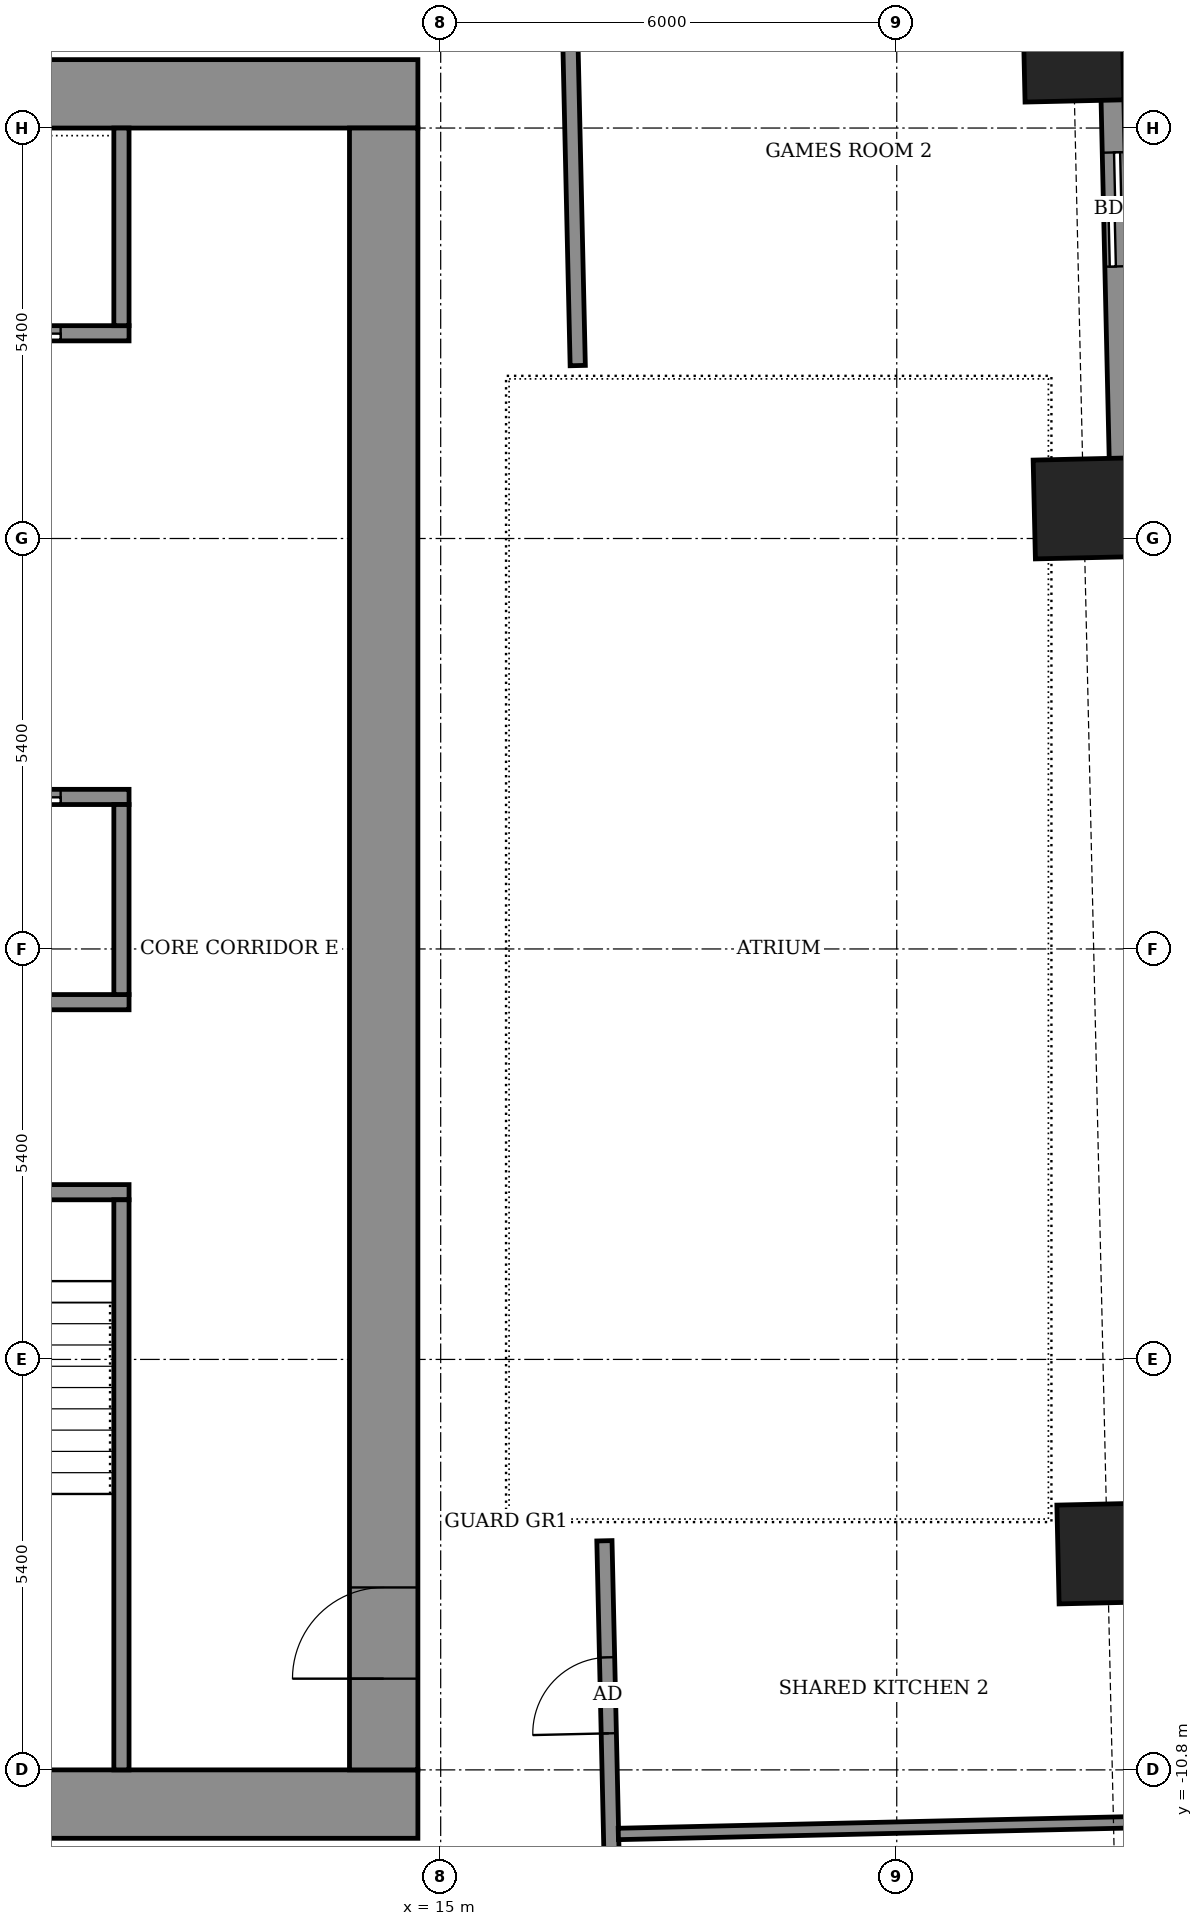
"""IFC4 building model, lengths in metres.
Left out: names, types, materials, properties, quantities, classifications, styles, units other than length and angle.
Written with IfcOpenShell. Run it as: python <this file> out.ifc"""

import sys

from ifc_helpers import new_model, si_unit, direction, frame, frame_2d, origin, origin_2d, place, context, subcontext, project, spatial, rectangle, extrude, element, fill, save


model = new_model("IFC4")
c1 = context("Model", 3, precision=1e-05, world=origin(), true_north=direction((0.0, 1.0)))
c2 = subcontext(c1, "Body", "Model", "MODEL_VIEW")
j1 = project(units=[si_unit("LENGTHUNIT", "METRE"), si_unit("PLANEANGLEUNIT", "RADIAN")], contexts=[c1])
p1 = place(None, origin())
s1 = spatial("IfcSite", under=j1, at=p1, CompositionType="ELEMENT")
p2 = place(p1, origin())
s2 = spatial("IfcBuilding", under=s1, at=p2, CompositionType="ELEMENT")
p3 = place(p2, frame((0.0, 0.0, 144.5)))
s3 = spatial("IfcBuildingStorey", under=s2, at=p3, CompositionType="ELEMENT", Elevation=144.5)
for number, where, z_axis, x_axis in (
    (1, (23.771, -7.952, -0.55), (0.0, 0.0, 1.0), (-0.023, 1.0, 0.0)),
    (2, (23.459, 5.796, -0.55), (0.0, 0.0, 1.0), (-0.023, 1.0, 0.0)),
    (3, (23.323, 11.806, -0.55), (0.0, 0.0, 1.0), (-0.023, 1.0, 0.0)),
):
    element("IfcColumn", number, at=place(p3, frame(where, z_axis=z_axis, x_axis=x_axis)), inside=s3, PredefinedType="COLUMN", context=c2, shape_type="SweptSolid", body=[
        extrude(rectangle(XDim=1.3, YDim=1.3, at=origin_2d()), origin(), (0.0, 0.0, 1.0), 3.6),
    ])
p4 = place(p3, frame((23.961, 5.752, 0.0), z_axis=(0.0, 0.0, 1.0), x_axis=(-0.022715362207, 0.999741972871, 0.0)))
e4 = element("IfcWall", 4, at=p4, inside=s3, PredefinedType="SOLIDWALL", context=c2, shape_type="SweptSolid", body=[
    extrude(rectangle(XDim=11.93, YDim=0.3, at=frame_2d((5.965, 0.0))), origin(), (0.0, 0.0, 1.0), 3.05),
])
p5 = place(p4, frame((3.228, 0.0, 0.0)))
e5 = element("IfcOpeningElement", 5, at=p5, cuts=e4, PredefinedType="OPENING", context=c2, shape_type="SweptSolid", body=[
    extrude(rectangle(XDim=1.5, YDim=2.4, at=frame_2d((0.75, 1.2))), frame((0.0, 0.16, 0.0), z_axis=(0.0, -1.0, 0.0), x_axis=(1.0, 0.0, 0.0)), (0.0, 0.0, 1.0), 0.32),
])
p6 = place(p4, frame((7.629, 0.0, 0.9)))
e6 = element("IfcOpeningElement", 6, at=p6, cuts=e4, PredefinedType="OPENING", context=c2, shape_type="SweptSolid", body=[
    extrude(rectangle(XDim=0.9, YDim=1.5, at=frame_2d((0.45, 0.75))), frame((0.0, 0.16, 0.0), z_axis=(0.0, -1.0, 0.0), x_axis=(1.0, 0.0, 0.0)), (0.0, 0.0, 1.0), 0.32),
])
p7 = place(p4, frame((9.316, 0.0, 0.9)))
e7 = element("IfcOpeningElement", 7, at=p7, cuts=e4, PredefinedType="OPENING", context=c2, shape_type="SweptSolid", body=[
    extrude(rectangle(XDim=1.2, YDim=1.5, at=frame_2d((0.6, 0.75))), frame((0.0, 0.16, 0.0), z_axis=(0.0, -1.0, 0.0), x_axis=(1.0, 0.0, 0.0)), (0.0, 0.0, 1.0), 0.32),
])
p8 = place(p3, frame((17.328, -15.448, 0.0), z_axis=(0.0, 0.0, 1.0), x_axis=(-0.022680883318, 0.999742755679, 0.0)))
e8 = element("IfcWall", 8, at=p8, inside=s3, PredefinedType="PARTITIONING", context=c2, shape_type="SweptSolid", body=[
    extrude(rectangle(XDim=7.664, YDim=0.2, at=frame_2d((3.832, 0.0))), origin(), (0.0, 0.0, 1.0), 3.05),
])
p9 = place(p8, frame((5.13, 0.0, 0.0)))
e9 = element("IfcOpeningElement", 9, at=p9, cuts=e8, PredefinedType="OPENING", context=c2, shape_type="SweptSolid", body=[
    extrude(rectangle(XDim=1.0, YDim=2.1, at=frame_2d((0.5, 1.05))), frame((0.0, 0.11, 0.0), z_axis=(0.0, -1.0, 0.0), x_axis=(1.0, 0.0, 0.0)), (0.0, 0.0, 1.0), 0.22),
])
p10 = place(p3, frame((17.337, -11.643, 0.0), z_axis=(0.0, 0.0, 1.0), x_axis=(0.999741061159, 0.022755452803, 0.0)))
e10 = element("IfcWall", 10, at=p10, inside=s3, PredefinedType="PARTITIONING", context=c2, shape_type="SweptSolid", body=[
    extrude(rectangle(XDim=7.167, YDim=0.15, at=frame_2d((3.583, 0.0))), origin(), (0.0, 0.0, 1.0), 2.55),
])
p11 = place(p3, frame((16.803, 7.675, 0.0), z_axis=(0.0, 0.0, 1.0), x_axis=(-0.022667483124, 0.999743059595, 0.0)))
e11 = element("IfcWall", 11, at=p11, inside=s3, PredefinedType="PARTITIONING", context=c2, shape_type="SweptSolid", body=[
    extrude(rectangle(XDim=5.245, YDim=0.2, at=frame_2d((2.623, 0.0))), origin(), (0.0, 0.0, 1.0), 3.05),
])
for number, where, z_axis, x_axis in (
    (12, (-14.7, -11.25, 0.0), (0.0, 0.0, 1.0), (1.0, 0.0, 0.0)),
    (13, (-14.7, 11.25, 0.0), (0.0, 0.0, 1.0), (1.0, 0.0, 0.0)),
):
    element("IfcWall", number, at=place(p3, frame(where, z_axis=z_axis, x_axis=x_axis)), inside=s3, PredefinedType="SHEAR", context=c2, shape_type="SweptSolid", body=[
        extrude(rectangle(XDim=29.4, YDim=0.9, at=frame_2d((14.7, 0.0))), origin(), (0.0, 0.0, 1.0), 3.6),
    ])
p12 = place(p3, frame((14.25, -10.8, 0.0), z_axis=(0.0, 0.0, 1.0), x_axis=(0.0, 1.0, 0.0)))
e14 = element("IfcWall", 14, at=p12, inside=s3, PredefinedType="SHEAR", context=c2, shape_type="SweptSolid", body=[
    extrude(rectangle(XDim=21.6, YDim=0.9, at=frame_2d((10.8, 0.0))), origin(), (0.0, 0.0, 1.0), 3.6),
])
p13 = place(p12, frame((1.2, 0.0, 0.0)))
e15 = element("IfcOpeningElement", 15, at=p13, cuts=e14, PredefinedType="OPENING", context=c2, shape_type="SweptSolid", body=[
    extrude(rectangle(XDim=1.2, YDim=2.1, at=frame_2d((0.6, 1.05))), frame((0.0, 0.46, 0.0), z_axis=(0.0, -1.0, 0.0), x_axis=(1.0, 0.0, 0.0)), (0.0, 0.0, 1.0), 0.92),
])
p14 = place(p3, frame((-10.9, -3.2, 0.0), z_axis=(0.0, 0.0, 1.0), x_axis=(1.0, 0.0, 0.0)))
e16 = element("IfcWall", 16, at=p14, inside=s3, PredefinedType="SHEAR", context=c2, shape_type="SweptSolid", body=[
    extrude(rectangle(XDim=21.8, YDim=0.2, at=frame_2d((10.9, 0.0))), origin(), (0.0, 0.0, 1.0), 3.05),
])
p15 = place(p14, frame((1.075, 0.0, 0.0)))
e17 = element("IfcOpeningElement", 17, at=p15, cuts=e16, PredefinedType="OPENING", context=c2, shape_type="SweptSolid", body=[
    extrude(rectangle(XDim=1.1, YDim=2.1, at=frame_2d((0.55, 1.05))), frame((0.0, 0.11, 0.0), z_axis=(0.0, -1.0, 0.0), x_axis=(1.0, 0.0, 0.0)), (0.0, 0.0, 1.0), 0.22),
])
p16 = place(p14, frame((10.325, 0.0, 0.0)))
e18 = element("IfcOpeningElement", 18, at=p16, cuts=e16, PredefinedType="OPENING", context=c2, shape_type="SweptSolid", body=[
    extrude(rectangle(XDim=1.1, YDim=2.1, at=frame_2d((0.55, 1.05))), frame((0.0, 0.11, 0.0), z_axis=(0.0, -1.0, 0.0), x_axis=(1.0, 0.0, 0.0)), (0.0, 0.0, 1.0), 0.22),
])
p17 = place(p14, frame((19.625, 0.0, 0.0)))
e19 = element("IfcOpeningElement", 19, at=p17, cuts=e16, PredefinedType="OPENING", context=c2, shape_type="SweptSolid", body=[
    extrude(rectangle(XDim=1.1, YDim=2.1, at=frame_2d((0.55, 1.05))), frame((0.0, 0.11, 0.0), z_axis=(0.0, -1.0, 0.0), x_axis=(1.0, 0.0, 0.0)), (0.0, 0.0, 1.0), 0.22),
])
p18 = place(p14, frame((5.7, 0.0, 0.0)))
e20 = element("IfcOpeningElement", 20, at=p18, cuts=e16, PredefinedType="OPENING", context=c2, shape_type="SweptSolid", body=[
    extrude(rectangle(XDim=1.1, YDim=2.1, at=frame_2d((0.55, 1.05))), frame((0.0, 0.11, 0.0), z_axis=(0.0, -1.0, 0.0), x_axis=(1.0, 0.0, 0.0)), (0.0, 0.0, 1.0), 0.22),
])
p19 = place(p14, frame((14.975, 0.0, 0.0)))
e21 = element("IfcOpeningElement", 21, at=p19, cuts=e16, PredefinedType="OPENING", context=c2, shape_type="SweptSolid", body=[
    extrude(rectangle(XDim=1.1, YDim=2.1, at=frame_2d((0.55, 1.05))), frame((0.0, 0.11, 0.0), z_axis=(0.0, -1.0, 0.0), x_axis=(1.0, 0.0, 0.0)), (0.0, 0.0, 1.0), 0.22),
])
p20 = place(p3, frame((-10.9, -0.7, 0.0), z_axis=(0.0, 0.0, 1.0), x_axis=(1.0, 0.0, 0.0)))
e22 = element("IfcWall", 22, at=p20, inside=s3, PredefinedType="SHEAR", context=c2, shape_type="SweptSolid", body=[
    extrude(rectangle(XDim=21.8, YDim=0.2, at=frame_2d((10.9, 0.0))), origin(), (0.0, 0.0, 1.0), 3.05),
])
p21 = place(p3, frame((-10.9, 2.0, 0.0), z_axis=(0.0, 0.0, 1.0), x_axis=(1.0, 0.0, 0.0)))
e23 = element("IfcWall", 23, at=p21, inside=s3, PredefinedType="SHEAR", context=c2, shape_type="SweptSolid", body=[
    extrude(rectangle(XDim=21.8, YDim=0.2, at=frame_2d((10.9, 0.0))), origin(), (0.0, 0.0, 1.0), 3.05),
])
p22 = place(p21, frame((14.4, 0.0, 0.0)))
e24 = element("IfcOpeningElement", 24, at=p22, cuts=e23, PredefinedType="OPENING", context=c2, shape_type="SweptSolid", body=[
    extrude(rectangle(XDim=1.1, YDim=2.1, at=frame_2d((0.55, 1.05))), frame((0.0, 0.11, 0.0), z_axis=(0.0, -1.0, 0.0), x_axis=(1.0, 0.0, 0.0)), (0.0, 0.0, 1.0), 0.22),
])
p23 = place(p21, frame((17.1, 0.0, 0.0)))
e25 = element("IfcOpeningElement", 25, at=p23, cuts=e23, PredefinedType="OPENING", context=c2, shape_type="SweptSolid", body=[
    extrude(rectangle(XDim=1.1, YDim=2.1, at=frame_2d((0.55, 1.05))), frame((0.0, 0.11, 0.0), z_axis=(0.0, -1.0, 0.0), x_axis=(1.0, 0.0, 0.0)), (0.0, 0.0, 1.0), 0.22),
])
p24 = place(p21, frame((19.8, 0.0, 0.0)))
e26 = element("IfcOpeningElement", 26, at=p24, cuts=e23, PredefinedType="OPENING", context=c2, shape_type="SweptSolid", body=[
    extrude(rectangle(XDim=1.1, YDim=2.1, at=frame_2d((0.55, 1.05))), frame((0.0, 0.11, 0.0), z_axis=(0.0, -1.0, 0.0), x_axis=(1.0, 0.0, 0.0)), (0.0, 0.0, 1.0), 0.22),
])
p25 = place(p21, frame((1.675, 0.0, 0.0)))
e27 = element("IfcOpeningElement", 27, at=p25, cuts=e23, PredefinedType="OPENING", context=c2, shape_type="SweptSolid", body=[
    extrude(rectangle(XDim=0.9, YDim=2.1, at=frame_2d((0.45, 1.05))), frame((0.0, 0.11, 0.0), z_axis=(0.0, -1.0, 0.0), x_axis=(1.0, 0.0, 0.0)), (0.0, 0.0, 1.0), 0.22),
])
p26 = place(p21, frame((8.425, 0.0, 0.0)))
e28 = element("IfcOpeningElement", 28, at=p26, cuts=e23, PredefinedType="OPENING", context=c2, shape_type="SweptSolid", body=[
    extrude(rectangle(XDim=0.9, YDim=2.1, at=frame_2d((0.45, 1.05))), frame((0.0, 0.11, 0.0), z_axis=(0.0, -1.0, 0.0), x_axis=(1.0, 0.0, 0.0)), (0.0, 0.0, 1.0), 0.22),
])
p27 = place(p3, frame((-10.9, 8.1, 0.0), z_axis=(0.0, 0.0, 1.0), x_axis=(1.0, 0.0, 0.0)))
e29 = element("IfcWall", 29, at=p27, inside=s3, PredefinedType="SHEAR", context=c2, shape_type="SweptSolid", body=[
    extrude(rectangle(XDim=21.8, YDim=0.2, at=frame_2d((10.9, 0.0))), origin(), (0.0, 0.0, 1.0), 3.05),
])
p28 = place(p27, frame((14.4, 0.0, 0.0)))
e30 = element("IfcOpeningElement", 30, at=p28, cuts=e29, PredefinedType="OPENING", context=c2, shape_type="SweptSolid", body=[
    extrude(rectangle(XDim=1.1, YDim=2.1, at=frame_2d((0.55, 1.05))), frame((0.0, 0.11, 0.0), z_axis=(0.0, -1.0, 0.0), x_axis=(1.0, 0.0, 0.0)), (0.0, 0.0, 1.0), 0.22),
])
p29 = place(p27, frame((17.1, 0.0, 0.0)))
e31 = element("IfcOpeningElement", 31, at=p29, cuts=e29, PredefinedType="OPENING", context=c2, shape_type="SweptSolid", body=[
    extrude(rectangle(XDim=1.1, YDim=2.1, at=frame_2d((0.55, 1.05))), frame((0.0, 0.11, 0.0), z_axis=(0.0, -1.0, 0.0), x_axis=(1.0, 0.0, 0.0)), (0.0, 0.0, 1.0), 0.22),
])
p30 = place(p27, frame((19.8, 0.0, 0.0)))
e32 = element("IfcOpeningElement", 32, at=p30, cuts=e29, PredefinedType="OPENING", context=c2, shape_type="SweptSolid", body=[
    extrude(rectangle(XDim=1.1, YDim=2.1, at=frame_2d((0.55, 1.05))), frame((0.0, 0.11, 0.0), z_axis=(0.0, -1.0, 0.0), x_axis=(1.0, 0.0, 0.0)), (0.0, 0.0, 1.0), 0.22),
])
p31 = place(p27, frame((1.675, 0.0, 0.0)))
e33 = element("IfcOpeningElement", 33, at=p31, cuts=e29, PredefinedType="OPENING", context=c2, shape_type="SweptSolid", body=[
    extrude(rectangle(XDim=0.9, YDim=2.1, at=frame_2d((0.45, 1.05))), frame((0.0, 0.11, 0.0), z_axis=(0.0, -1.0, 0.0), x_axis=(1.0, 0.0, 0.0)), (0.0, 0.0, 1.0), 0.22),
])
p32 = place(p27, frame((8.425, 0.0, 0.0)))
e34 = element("IfcOpeningElement", 34, at=p32, cuts=e29, PredefinedType="OPENING", context=c2, shape_type="SweptSolid", body=[
    extrude(rectangle(XDim=0.9, YDim=2.1, at=frame_2d((0.45, 1.05))), frame((0.0, 0.11, 0.0), z_axis=(0.0, -1.0, 0.0), x_axis=(1.0, 0.0, 0.0)), (0.0, 0.0, 1.0), 0.22),
])
p33 = place(p3, frame((10.8, -10.8, 0.0), z_axis=(0.0, 0.0, 1.0), x_axis=(0.0, 1.0, 0.0)))
e35 = element("IfcWall", 35, at=p33, inside=s3, PredefinedType="SHEAR", context=c2, shape_type="SweptSolid", body=[
    extrude(rectangle(XDim=7.5, YDim=0.2, at=frame_2d((3.75, 0.0))), origin(), (0.0, 0.0, 1.0), 3.05),
])
p34 = place(p3, frame((10.8, -0.6, 0.0), z_axis=(0.0, 0.0, 1.0), x_axis=(0.0, 1.0, 0.0)))
e36 = element("IfcWall", 36, at=p34, inside=s3, PredefinedType="SHEAR", context=c2, shape_type="SweptSolid", body=[
    extrude(rectangle(XDim=2.5, YDim=0.2, at=frame_2d((1.25, 0.0))), origin(), (0.0, 0.0, 1.0), 3.05),
])
p35 = place(p3, frame((10.8, 8.2, 0.0), z_axis=(0.0, 0.0, 1.0), x_axis=(0.0, 1.0, 0.0)))
e37 = element("IfcWall", 37, at=p35, inside=s3, PredefinedType="SHEAR", context=c2, shape_type="SweptSolid", body=[
    extrude(rectangle(XDim=2.6, YDim=0.2, at=frame_2d((1.3, 0.0))), origin(), (0.0, 0.0, 1.0), 3.05),
])
p36 = place(p5, origin())
e38 = element("IfcDoor", 38, at=p36, inside=s3, OperationType="SLIDING_TO_LEFT", PredefinedType="DOOR", context=c2, shape_type="SweptSolid", body=[
    extrude(rectangle(XDim=1.5, YDim=2.4, at=frame_2d((0.75, 1.2))), frame((0.0, 0.025, 0.0), z_axis=(0.0, -1.0, 0.0), x_axis=(1.0, 0.0, 0.0)), (0.0, 0.0, 1.0), 0.05),
])
fill(e5, e38)
p37 = place(p9, origin())
e39 = element("IfcDoor", 39, at=p37, inside=s3, OperationType="SINGLE_SWING_RIGHT", PredefinedType="DOOR", context=c2, shape_type="SweptSolid", body=[
    extrude(rectangle(XDim=1.0, YDim=2.1, at=frame_2d((0.5, 1.05))), frame((0.0, 0.025, 0.0), z_axis=(0.0, -1.0, 0.0), x_axis=(1.0, 0.0, 0.0)), (0.0, 0.0, 1.0), 0.05),
])
fill(e9, e39)
p38 = place(p13, origin())
e40 = element("IfcDoor", 40, at=p38, inside=s3, OperationType="DOUBLE_DOOR_SINGLE_SWING", PredefinedType="DOOR", context=c2, shape_type="SweptSolid", body=[
    extrude(rectangle(XDim=1.2, YDim=2.1, at=frame_2d((0.6, 1.05))), frame((0.0, 0.025, 0.0), z_axis=(0.0, -1.0, 0.0), x_axis=(1.0, 0.0, 0.0)), (0.0, 0.0, 1.0), 0.05),
])
fill(e15, e40)
p39 = place(p24, origin())
e41 = element("IfcDoor", 41, at=p39, inside=s3, OperationType="SLIDING_TO_LEFT", PredefinedType="DOOR", context=c2, shape_type="SweptSolid", body=[
    extrude(rectangle(XDim=1.1, YDim=2.1, at=frame_2d((0.55, 1.05))), frame((0.0, 0.025, 0.0), z_axis=(0.0, -1.0, 0.0), x_axis=(1.0, 0.0, 0.0)), (0.0, 0.0, 1.0), 0.05),
])
fill(e26, e41)
p40 = place(p30, origin())
e42 = element("IfcDoor", 42, at=p40, inside=s3, OperationType="SLIDING_TO_LEFT", PredefinedType="DOOR", context=c2, shape_type="SweptSolid", body=[
    extrude(rectangle(XDim=1.1, YDim=2.1, at=frame_2d((0.55, 1.05))), frame((0.0, 0.025, 0.0), z_axis=(0.0, -1.0, 0.0), x_axis=(1.0, 0.0, 0.0)), (0.0, 0.0, 1.0), 0.05),
])
fill(e32, e42)
save(model, sys.argv[1])
